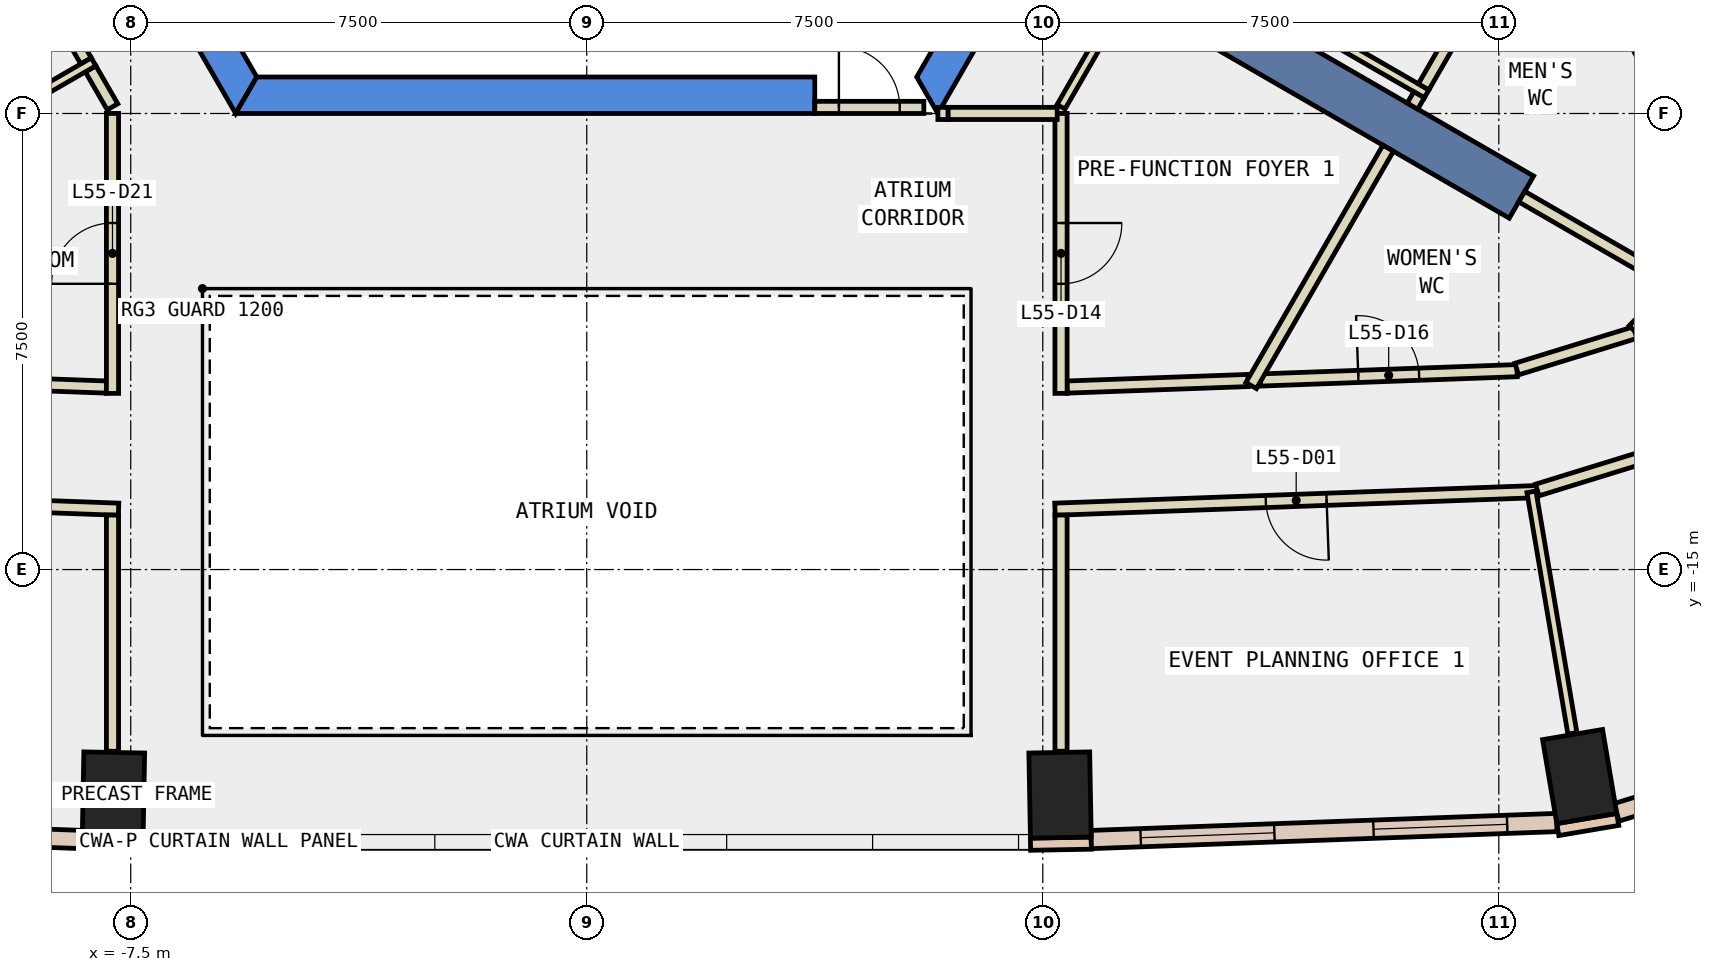
"""IFC4 building model, lengths in metres.
Left out: names, types, materials, properties, quantities, classifications, styles, units other than length and angle.
Written with IfcOpenShell. Run it as: python <this file> out.ifc"""

import sys

from ifc_helpers import new_model, si_unit, direction, frame, frame_2d, origin, origin_2d, place, context, subcontext, project, spatial, polyline, rectangle, outline, extrude, element, fill, save


model = new_model("IFC4")
c1 = context("Model", 3, precision=1e-05, world=origin(), true_north=direction((0.0, 1.0)))
c2 = subcontext(c1, "Body", "Model", "MODEL_VIEW")
j1 = project(units=[si_unit("LENGTHUNIT", "METRE"), si_unit("PLANEANGLEUNIT", "RADIAN")], contexts=[c1])
p1 = place(None, origin())
s1 = spatial("IfcSite", under=j1, at=p1, CompositionType="ELEMENT")
p2 = place(p1, origin())
s2 = spatial("IfcBuilding", under=s1, at=p2, CompositionType="ELEMENT")
p3 = place(p2, frame((0.0, 0.0, 245.0)))
s3 = spatial("IfcBuildingStorey", under=s2, at=p3, CompositionType="ELEMENT", Elevation=245.0)
for number, where, z_axis, x_axis in (
    (1, (-7.784, -18.708, -0.34), (0.0, 0.0, 1.0), (-1.0, 0.018, 0.0)),
    (2, (7.784, -18.708, -0.34), (0.0, 0.0, 1.0), (1.0, 0.018, 0.0)),
    (3, (16.33, -18.404, -0.34), (0.0, 0.0, 1.0), (0.986, 0.167, 0.0)),
):
    element("IfcColumn", number, at=place(p3, frame(where, z_axis=z_axis, x_axis=x_axis)), inside=s3, PredefinedType="COLUMN", context=c2, shape_type="SweptSolid", body=[
        extrude(rectangle(XDim=1.0, YDim=1.4, at=origin_2d()), origin(), (0.0, 0.0, 1.0), 3.6),
    ])
p4 = place(p3, frame((0.0, 0.0, -0.34)))
e4 = element("IfcWall", 4, at=p4, inside=s3, PredefinedType="SHEAR", context=c2, shape_type="SweptSolid", body=[
    extrude(outline(polyline([(-11.547, 2.5), (-5.774, -7.5), (-5.427, -6.9), (-10.854, 2.5), (-11.547, 2.5)])), origin(), (0.0, 0.0, 1.0), 3.6),
])
p5 = place(p3, frame((0.0, 0.0, -0.34)))
e5 = element("IfcWall", 5, at=p5, inside=s3, PredefinedType="SHEAR", context=c2, shape_type="SweptSolid", body=[
    extrude(outline(polyline([(3.75, -7.5), (3.75, -6.9), (-5.427, -6.9), (-5.774, -7.5), (3.75, -7.5)])), origin(), (0.0, 0.0, 1.0), 3.6),
])
p6 = place(p3, frame((0.0, 0.0, -0.34)))
e6 = element("IfcWall", 6, at=p6, inside=s3, PredefinedType="SHEAR", context=c2, shape_type="SweptSolid", body=[
    extrude(outline(polyline([(5.774, -7.5), (11.547, 2.5), (10.854, 2.5), (5.427, -6.9), (5.774, -7.5)])), origin(), (0.0, 0.0, 1.0), 3.6),
])
for number, where, z_axis, x_axis in (
    (7, (7.578, -4.375, -0.34), (0.0, 0.0, 1.0), (0.866, -0.5, 0.0)),
    (8, (-7.578, -4.375, -0.34), (0.0, 0.0, 1.0), (-0.866, -0.5, 0.0)),
):
    element("IfcWall", number, at=place(p3, frame(where, z_axis=z_axis, x_axis=x_axis)), inside=s3, PredefinedType="SHEAR", context=c2, shape_type="SweptSolid", body=[
        extrude(rectangle(XDim=9.0, YDim=0.8, at=frame_2d((4.5, 0.0))), origin(), (0.0, 0.0, 1.0), 3.6),
    ])
for number, where, z_axis, x_axis in (
    (9, (-8.298, -19.499, 0.0), (0.0, 0.0, 1.0), (1.0, -0.018, 0.0)),
    (10, (7.298, -19.517, 0.0), (0.0, 0.0, 1.0), (1.0, 0.018, 0.0)),
    (11, (15.97, -19.276, 0.0), (0.0, 0.0, 1.0), (0.986, 0.167, 0.0)),
):
    element("IfcWall", number, at=place(p3, frame(where, z_axis=z_axis, x_axis=x_axis)), inside=s3, PredefinedType="STANDARD", context=c2, shape_type="SweptSolid", body=[
        extrude(rectangle(XDim=1.0, YDim=0.2, at=frame_2d((0.5, 0.0))), origin(), (0.0, 0.0, 1.0), 3.26),
    ])
p7 = place(p3, frame((-15.952, -19.16, 0.0), z_axis=(0.0, 0.0, 1.0), x_axis=(0.999331753125, -0.036551979363, 0.0)))
e12 = element("IfcWall", 12, at=p7, inside=s3, PredefinedType="STANDARD", context=c2, shape_type="SweptSolid", body=[
    extrude(rectangle(XDim=7.661, YDim=0.3, at=frame_2d((3.831, 0.0))), origin(), (0.0, 0.0, 1.0), 3.26),
])
p8 = place(p7, frame((0.815, 0.0, 0.9)))
e13 = element("IfcOpeningElement", 13, at=p8, cuts=e12, PredefinedType="OPENING", context=c2, shape_type="SweptSolid", body=[
    extrude(rectangle(XDim=2.2, YDim=2.0, at=frame_2d((1.1, 1.0))), frame((0.0, 0.16, 0.0), z_axis=(0.0, -1.0, 0.0), x_axis=(1.0, 0.0, 0.0)), (0.0, 0.0, 1.0), 0.32),
])
p9 = place(p7, frame((4.646, 0.0, 0.9)))
e14 = element("IfcOpeningElement", 14, at=p9, cuts=e12, PredefinedType="OPENING", context=c2, shape_type="SweptSolid", body=[
    extrude(rectangle(XDim=2.2, YDim=2.0, at=frame_2d((1.1, 1.0))), frame((0.0, 0.16, 0.0), z_axis=(0.0, -1.0, 0.0), x_axis=(1.0, 0.0, 0.0)), (0.0, 0.0, 1.0), 0.32),
])
p10 = place(p3, frame((8.296, -19.44, 0.0), z_axis=(0.0, 0.0, 1.0), x_axis=(0.999331753125, 0.036551979363, 0.0)))
e15 = element("IfcWall", 15, at=p10, inside=s3, PredefinedType="STANDARD", context=c2, shape_type="SweptSolid", body=[
    extrude(rectangle(XDim=7.661, YDim=0.3, at=frame_2d((3.831, 0.0))), origin(), (0.0, 0.0, 1.0), 3.26),
])
p11 = place(p10, frame((0.815, 0.0, 0.9)))
e16 = element("IfcOpeningElement", 16, at=p11, cuts=e15, PredefinedType="OPENING", context=c2, shape_type="SweptSolid", body=[
    extrude(rectangle(XDim=2.2, YDim=2.0, at=frame_2d((1.1, 1.0))), frame((0.0, 0.16, 0.0), z_axis=(0.0, -1.0, 0.0), x_axis=(1.0, 0.0, 0.0)), (0.0, 0.0, 1.0), 0.32),
])
p12 = place(p10, frame((4.646, 0.0, 0.9)))
e17 = element("IfcOpeningElement", 17, at=p12, cuts=e15, PredefinedType="OPENING", context=c2, shape_type="SweptSolid", body=[
    extrude(rectangle(XDim=2.2, YDim=2.0, at=frame_2d((1.1, 1.0))), frame((0.0, 0.16, 0.0), z_axis=(0.0, -1.0, 0.0), x_axis=(1.0, 0.0, 0.0)), (0.0, 0.0, 1.0), 0.32),
])
p13 = place(p3, frame((16.936, -18.993, 0.0), z_axis=(0.0, 0.0, 1.0), x_axis=(0.955646189569, 0.2945171648, 0.0)))
e18 = element("IfcWall", 18, at=p13, inside=s3, PredefinedType="STANDARD", context=c2, shape_type="SweptSolid", body=[
    extrude(rectangle(XDim=3.898, YDim=0.3, at=frame_2d((1.949, 0.0))), origin(), (0.0, 0.0, 1.0), 3.26),
])
p14 = place(p13, frame((1.249, 0.0, 0.9)))
e19 = element("IfcOpeningElement", 19, at=p14, cuts=e18, PredefinedType="OPENING", context=c2, shape_type="SweptSolid", body=[
    extrude(rectangle(XDim=1.4, YDim=2.0, at=frame_2d((0.7, 1.0))), frame((0.0, 0.16, 0.0), z_axis=(0.0, -1.0, 0.0), x_axis=(1.0, 0.0, 0.0)), (0.0, 0.0, 1.0), 0.32),
])
p15 = place(p3, frame((7.9, -11.999, 0.0), z_axis=(0.0, 0.0, 1.0), x_axis=(0.999343711998, 0.036223546064, 0.0)))
e20 = element("IfcWall", 20, at=p15, inside=s3, PredefinedType="PARTITIONING", context=c2, shape_type="SweptSolid", body=[
    extrude(rectangle(XDim=2.979, YDim=0.2, at=frame_2d((1.49, 0.0))), origin(), (0.0, 0.0, 1.0), 3.26),
])
p16 = place(p3, frame((11.077, -11.883, 0.0), z_axis=(0.0, 0.0, 1.0), x_axis=(0.999335333519, 0.036453959732, 0.0)))
e21 = element("IfcWall", 21, at=p16, inside=s3, PredefinedType="PARTITIONING", context=c2, shape_type="SweptSolid", body=[
    extrude(rectangle(XDim=4.226, YDim=0.2, at=frame_2d((2.113, 0.0))), origin(), (0.0, 0.0, 1.0), 3.26),
])
p17 = place(p16, frame((1.613, 0.0, 0.0)))
e22 = element("IfcOpeningElement", 22, at=p17, cuts=e21, PredefinedType="OPENING", context=c2, shape_type="SweptSolid", body=[
    extrude(rectangle(XDim=1.0, YDim=2.1, at=frame_2d((0.5, 1.05))), frame((0.0, 0.11, 0.0), z_axis=(0.0, -1.0, 0.0), x_axis=(1.0, 0.0, 0.0)), (0.0, 0.0, 1.0), 0.22),
])
p18 = place(p3, frame((15.295, -11.703, 0.0), z_axis=(0.0, 0.0, 1.0), x_axis=(0.95563113363, 0.294566013716, 0.0)))
e23 = element("IfcWall", 23, at=p18, inside=s3, PredefinedType="PARTITIONING", context=c2, shape_type="SweptSolid", body=[
    extrude(rectangle(XDim=2.036, YDim=0.2, at=frame_2d((1.018, 0.0))), origin(), (0.0, 0.0, 1.0), 3.26),
])
p19 = place(p3, frame((17.215, -11.061, 0.0), z_axis=(0.0, 0.0, 1.0), x_axis=(0.698527813511, 0.715582904877, 0.0)))
e24 = element("IfcWall", 24, at=p19, inside=s3, PredefinedType="PARTITIONING", context=c2, shape_type="SweptSolid", body=[
    extrude(rectangle(XDim=1.002, YDim=0.2, at=frame_2d((0.501, 0.0))), origin(), (0.0, 0.0, 1.0), 3.26),
])
p20 = place(p3, frame((17.804, -7.374, 0.0), z_axis=(0.0, 0.0, 1.0), x_axis=(-0.465179971699, 0.885216128372, 0.0)))
e25 = element("IfcWall", 25, at=p20, inside=s3, PredefinedType="PARTITIONING", context=c2, shape_type="SweptSolid", body=[
    extrude(rectangle(XDim=4.424, YDim=0.2, at=frame_2d((2.212, 0.0))), origin(), (0.0, 0.0, 1.0), 3.26),
])
p21 = place(p20, frame((1.712, 0.0, 0.0)))
e26 = element("IfcOpeningElement", 26, at=p21, cuts=e25, PredefinedType="OPENING", context=c2, shape_type="SweptSolid", body=[
    extrude(rectangle(XDim=1.0, YDim=2.1, at=frame_2d((0.5, 1.05))), frame((0.0, 0.11, 0.0), z_axis=(0.0, -1.0, 0.0), x_axis=(1.0, 0.0, 0.0)), (0.0, 0.0, 1.0), 0.22),
])
p22 = place(p3, frame((-8.235, -6.636, 0.0), z_axis=(0.0, 0.0, 1.0), x_axis=(-0.500089055364, 0.86597398154, 0.0)))
e27 = element("IfcWall", 27, at=p22, inside=s3, PredefinedType="PARTITIONING", context=c2, shape_type="SweptSolid", body=[
    extrude(rectangle(XDim=1.23, YDim=0.2, at=frame_2d((0.615, 0.0))), origin(), (0.0, 0.0, 1.0), 3.26),
])
p23 = place(p3, frame((-7.8, -7.39, 0.0), z_axis=(0.0, 0.0, 1.0), x_axis=(-0.499712670472, 0.866191230024, 0.0)))
e28 = element("IfcWall", 28, at=p23, inside=s3, PredefinedType="PARTITIONING", context=c2, shape_type="SweptSolid", body=[
    extrude(rectangle(XDim=0.72, YDim=0.2, at=frame_2d((0.36, 0.0))), origin(), (0.0, 0.0, 1.0), 3.26),
])
p24 = place(p3, frame((-11.052, -11.884, 0.0), z_axis=(0.0, 0.0, 1.0), x_axis=(0.999335249241, -0.036456270033, 0.0)))
e29 = element("IfcWall", 29, at=p24, inside=s3, PredefinedType="PARTITIONING", context=c2, shape_type="SweptSolid", body=[
    extrude(rectangle(XDim=3.154, YDim=0.2, at=frame_2d((1.577, 0.0))), origin(), (0.0, 0.0, 1.0), 3.26),
])
p25 = place(p3, frame((15.636, -13.718, 0.0), z_axis=(0.0, 0.0, 1.0), x_axis=(-0.99933282306, -0.036522715615, 0.0)))
e30 = element("IfcWall", 30, at=p25, inside=s3, PredefinedType="PARTITIONING", context=c2, shape_type="SweptSolid", body=[
    extrude(rectangle(XDim=7.941, YDim=0.2, at=frame_2d((3.971, 0.0))), origin(), (0.0, 0.0, 1.0), 3.26),
])
p26 = place(p25, frame((3.471, 0.0, 0.0)))
e31 = element("IfcOpeningElement", 31, at=p26, cuts=e30, PredefinedType="OPENING", context=c2, shape_type="SweptSolid", body=[
    extrude(rectangle(XDim=1.0, YDim=2.1, at=frame_2d((0.5, 1.05))), frame((0.0, 0.11, 0.0), z_axis=(0.0, -1.0, 0.0), x_axis=(1.0, 0.0, 0.0)), (0.0, 0.0, 1.0), 0.22),
])
p27 = place(p3, frame((18.317, -12.864, 0.0), z_axis=(0.0, 0.0, 1.0), x_axis=(-0.955600342663, -0.294665887239, 0.0)))
e32 = element("IfcWall", 32, at=p27, inside=s3, PredefinedType="PARTITIONING", context=c2, shape_type="SweptSolid", body=[
    extrude(rectangle(XDim=2.81, YDim=0.2, at=frame_2d((1.405, 0.0))), origin(), (0.0, 0.0, 1.0), 3.26),
])
p28 = place(p3, frame((16.947, -1.443, 0.0), z_axis=(0.0, 0.0, 1.0), x_axis=(0.465133414481, -0.88524059257, 0.0)))
e33 = element("IfcWall", 33, at=p28, inside=s3, PredefinedType="PARTITIONING", context=c2, shape_type="SweptSolid", body=[
    extrude(rectangle(XDim=5.91, YDim=0.2, at=frame_2d((2.955, 0.0))), origin(), (0.0, 0.0, 1.0), 3.26),
])
p29 = place(p28, frame((2.455, 0.0, 0.0)))
e34 = element("IfcOpeningElement", 34, at=p29, cuts=e33, PredefinedType="OPENING", context=c2, shape_type="SweptSolid", body=[
    extrude(rectangle(XDim=1.0, YDim=2.1, at=frame_2d((0.5, 1.05))), frame((0.0, 0.11, 0.0), z_axis=(0.0, -1.0, 0.0), x_axis=(1.0, 0.0, 0.0)), (0.0, 0.0, 1.0), 0.22),
])
p30 = place(p3, frame((-7.7, -14.008, 0.0), z_axis=(0.0, 0.0, 1.0), x_axis=(-0.99933282306, 0.036522715615, 0.0)))
e35 = element("IfcWall", 35, at=p30, inside=s3, PredefinedType="PARTITIONING", context=c2, shape_type="SweptSolid", body=[
    extrude(rectangle(XDim=7.941, YDim=0.2, at=frame_2d((3.971, 0.0))), origin(), (0.0, 0.0, 1.0), 3.26),
])
p31 = place(p30, frame((3.471, 0.0, 0.0)))
e36 = element("IfcOpeningElement", 36, at=p31, cuts=e35, PredefinedType="OPENING", context=c2, shape_type="SweptSolid", body=[
    extrude(rectangle(XDim=1.0, YDim=2.1, at=frame_2d((0.5, 1.05))), frame((0.0, 0.11, 0.0), z_axis=(0.0, -1.0, 0.0), x_axis=(1.0, 0.0, 0.0)), (0.0, 0.0, 1.0), 0.22),
])
p32 = place(p3, frame((5.775, -7.499, 0.0), z_axis=(0.0, 0.0, 1.0), x_axis=(1.0, 0.0, 0.0)))
e37 = element("IfcWall", 37, at=p32, inside=s3, PredefinedType="PARTITIONING", context=c2, shape_type="SweptSolid", body=[
    extrude(rectangle(XDim=0.169, YDim=0.2, at=frame_2d((0.084, 0.0))), origin(), (0.0, 0.0, 1.0), 2.4),
])
p33 = place(p3, frame((7.8, -7.39, 0.0), z_axis=(0.0, 0.0, 1.0), x_axis=(0.499977374825, 0.866038466041, 0.0)))
e38 = element("IfcWall", 38, at=p33, inside=s3, PredefinedType="PARTITIONING", context=c2, shape_type="SweptSolid", body=[
    extrude(rectangle(XDim=2.1, YDim=0.15, at=frame_2d((1.05, 0.0))), origin(), (0.0, 0.0, 1.0), 3.26),
])
p34 = place(p3, frame((7.8, -7.499, 0.0), z_axis=(0.0, 0.0, 1.0), x_axis=(0.0, -1.0, 0.0)))
e39 = element("IfcWall", 39, at=p34, inside=s3, PredefinedType="PARTITIONING", context=c2, shape_type="SweptSolid", body=[
    extrude(rectangle(XDim=4.604, YDim=0.2, at=frame_2d((2.302, 0.0))), origin(), (0.0, 0.0, 1.0), 3.26),
])
p35 = place(p34, frame((1.802, 0.0, 0.0)))
e40 = element("IfcOpeningElement", 40, at=p35, cuts=e39, PredefinedType="OPENING", context=c2, shape_type="SweptSolid", body=[
    extrude(rectangle(XDim=1.0, YDim=2.1, at=frame_2d((0.5, 1.05))), frame((0.0, 0.11, 0.0), z_axis=(0.0, -1.0, 0.0), x_axis=(1.0, 0.0, 0.0)), (0.0, 0.0, 1.0), 0.22),
])
p36 = place(p3, frame((-7.8, -12.103, 0.0), z_axis=(0.0, 0.0, 1.0), x_axis=(0.0, 1.0, 0.0)))
e41 = element("IfcWall", 41, at=p36, inside=s3, PredefinedType="PARTITIONING", context=c2, shape_type="SweptSolid", body=[
    extrude(rectangle(XDim=4.604, YDim=0.2, at=frame_2d((2.302, 0.0))), origin(), (0.0, 0.0, 1.0), 3.26),
])
p37 = place(p36, frame((1.802, 0.0, 0.0)))
e42 = element("IfcOpeningElement", 42, at=p37, cuts=e41, PredefinedType="OPENING", context=c2, shape_type="SweptSolid", body=[
    extrude(rectangle(XDim=1.0, YDim=2.1, at=frame_2d((0.5, 1.05))), frame((0.0, 0.11, 0.0), z_axis=(0.0, -1.0, 0.0), x_axis=(1.0, 0.0, 0.0)), (0.0, 0.0, 1.0), 0.22),
])
for number, where, z_axis, x_axis in (
    (43, (7.8, -14.104, 0.0), (0.0, 0.0, 1.0), (0.0, -1.0, 0.0)),
    (44, (-7.8, -17.988, 0.0), (0.0, 0.0, 1.0), (0.0, 1.0, 0.0)),
):
    element("IfcWall", number, at=place(p3, frame(where, z_axis=z_axis, x_axis=x_axis)), inside=s3, PredefinedType="PARTITIONING", context=c2, shape_type="SweptSolid", body=[
        extrude(rectangle(XDim=3.884, YDim=0.2, at=frame_2d((1.942, 0.0))), origin(), (0.0, 0.0, 1.0), 3.26),
    ])
p38 = place(p3, frame((9.395, -4.627, 0.0), z_axis=(0.0, 0.0, 1.0), x_axis=(0.866034131428, -0.499984882974, 0.0)))
e45 = element("IfcWall", 45, at=p38, inside=s3, PredefinedType="PARTITIONING", context=c2, shape_type="SweptSolid", body=[
    extrude(rectangle(XDim=5.1, YDim=0.15, at=frame_2d((2.55, 0.0))), origin(), (0.0, 0.0, 1.0), 3.26),
])
p39 = place(p3, frame((13.18, -8.071, 0.0), z_axis=(0.0, 0.0, 1.0), x_axis=(-0.499914724673, -0.86607463192, 0.0)))
e46 = element("IfcWall", 46, at=p39, inside=s3, PredefinedType="PARTITIONING", context=c2, shape_type="SweptSolid", body=[
    extrude(rectangle(XDim=4.507, YDim=0.2, at=frame_2d((2.253, 0.0))), origin(), (0.0, 0.0, 1.0), 3.26),
])
p40 = place(p3, frame((13.688, -7.192, 0.0), z_axis=(0.0, 0.0, 1.0), x_axis=(-0.499787711288, -0.866147934042, 0.0)))
e47 = element("IfcWall", 47, at=p40, inside=s3, PredefinedType="PARTITIONING", context=c2, shape_type="SweptSolid", body=[
    extrude(rectangle(XDim=0.216, YDim=0.2, at=frame_2d((0.108, 0.0))), origin(), (0.0, 0.0, 1.0), 3.26),
])
p41 = place(p3, frame((15.793, -3.546, 0.0), z_axis=(0.0, 0.0, 1.0), x_axis=(-0.500000064182, -0.866025366729, 0.0)))
e48 = element("IfcWall", 48, at=p41, inside=s3, PredefinedType="PARTITIONING", context=c2, shape_type="SweptSolid", body=[
    extrude(rectangle(XDim=4.06, YDim=0.2, at=frame_2d((2.03, 0.0))), origin(), (0.0, 0.0, 1.0), 3.26),
])
p42 = place(p3, frame((15.377, -8.867, 0.0), z_axis=(0.0, 0.0, 1.0), x_axis=(0.865965767548, -0.500103278768, 0.0)))
e49 = element("IfcWall", 49, at=p42, inside=s3, PredefinedType="PARTITIONING", context=c2, shape_type="SweptSolid", body=[
    extrude(rectangle(XDim=3.033, YDim=0.2, at=frame_2d((1.517, 0.0))), origin(), (0.0, 0.0, 1.0), 3.26),
])
p43 = place(p3, frame((-8.111, -6.651, 0.0), z_axis=(0.0, 0.0, 1.0), x_axis=(-0.865984471925, -0.50007088936, 0.0)))
e50 = element("IfcWall", 50, at=p43, inside=s3, PredefinedType="PARTITIONING", context=c2, shape_type="SweptSolid", body=[
    extrude(rectangle(XDim=5.176, YDim=0.15, at=frame_2d((2.588, 0.0))), origin(), (0.0, 0.0, 1.0), 3.26),
])
p44 = place(p3, frame((15.537, -13.722, 0.0), z_axis=(0.0, 0.0, 1.0), x_axis=(0.167012380144, -0.985954798598, 0.0)))
e51 = element("IfcWall", 51, at=p44, inside=s3, PredefinedType="PARTITIONING", context=c2, shape_type="SweptSolid", body=[
    extrude(rectangle(XDim=4.029, YDim=0.15, at=frame_2d((2.014, 0.0))), origin(), (0.0, 0.0, 1.0), 3.26),
])
p45 = place(p3, frame((3.75, -7.4, 0.0), z_axis=(0.0, 0.0, 1.0), x_axis=(1.0, 0.0, 0.0)))
e52 = element("IfcWall", 52, at=p45, inside=s3, PredefinedType="PARTITIONING", context=c2, shape_type="SweptSolid", body=[
    extrude(rectangle(XDim=1.794, YDim=0.2, at=frame_2d((0.897, 0.0))), origin(), (0.0, 0.0, 1.0), 2.4),
])
p46 = place(p45, frame((0.397, 0.0, 0.0)))
e53 = element("IfcOpeningElement", 53, at=p46, cuts=e52, PredefinedType="OPENING", context=c2, shape_type="SweptSolid", body=[
    extrude(rectangle(XDim=1.0, YDim=2.1, at=frame_2d((0.5, 1.05))), frame((0.0, 0.11, 0.0), z_axis=(0.0, -1.0, 0.0), x_axis=(1.0, 0.0, 0.0)), (0.0, 0.0, 1.0), 0.22),
])
p47 = place(p3, frame((5.944, -7.499, 0.0), z_axis=(0.0, 0.0, 1.0), x_axis=(1.0, 0.0, 0.0)))
e54 = element("IfcWall", 54, at=p47, inside=s3, PredefinedType="PARTITIONING", context=c2, shape_type="SweptSolid", body=[
    extrude(rectangle(XDim=1.793, YDim=0.2, at=frame_2d((0.896, 0.0))), origin(), (0.0, 0.0, 1.0), 3.26),
])
p48 = place(p11, origin())
e55 = element("IfcWindow", 55, at=p48, inside=s3, PartitioningType="SINGLE_PANEL", PredefinedType="WINDOW", context=c2, shape_type="SweptSolid", body=[
    extrude(rectangle(XDim=2.2, YDim=2.0, at=frame_2d((1.1, 1.0))), frame((0.0, 0.03, 0.0), z_axis=(0.0, -1.0, 0.0), x_axis=(1.0, 0.0, 0.0)), (0.0, 0.0, 1.0), 0.06),
])
fill(e16, e55)
p49 = place(p12, origin())
e56 = element("IfcWindow", 56, at=p49, inside=s3, PartitioningType="SINGLE_PANEL", PredefinedType="WINDOW", context=c2, shape_type="SweptSolid", body=[
    extrude(rectangle(XDim=2.2, YDim=2.0, at=frame_2d((1.1, 1.0))), frame((0.0, 0.03, 0.0), z_axis=(0.0, -1.0, 0.0), x_axis=(1.0, 0.0, 0.0)), (0.0, 0.0, 1.0), 0.06),
])
fill(e17, e56)
p50 = place(p26, origin())
e57 = element("IfcDoor", 57, at=p50, inside=s3, OperationType="SINGLE_SWING_RIGHT", PredefinedType="DOOR", context=c2, shape_type="SweptSolid", body=[
    extrude(rectangle(XDim=1.0, YDim=2.1, at=frame_2d((0.5, 1.05))), frame((0.0, 0.025, 0.0), z_axis=(0.0, -1.0, 0.0), x_axis=(1.0, 0.0, 0.0)), (0.0, 0.0, 1.0), 0.05),
])
fill(e31, e57)
p51 = place(p35, origin())
e58 = element("IfcDoor", 58, at=p51, inside=s3, OperationType="SINGLE_SWING_LEFT", PredefinedType="DOOR", context=c2, shape_type="SweptSolid", body=[
    extrude(rectangle(XDim=1.0, YDim=2.1, at=frame_2d((0.5, 1.05))), frame((0.0, 0.025, 0.0), z_axis=(0.0, -1.0, 0.0), x_axis=(1.0, 0.0, 0.0)), (0.0, 0.0, 1.0), 0.05),
])
fill(e40, e58)
p52 = place(p17, origin())
e59 = element("IfcDoor", 59, at=p52, inside=s3, OperationType="SINGLE_SWING_LEFT", PredefinedType="DOOR", context=c2, shape_type="SweptSolid", body=[
    extrude(rectangle(XDim=1.0, YDim=2.1, at=frame_2d((0.5, 1.05))), frame((0.0, 0.025, 0.0), z_axis=(0.0, -1.0, 0.0), x_axis=(1.0, 0.0, 0.0)), (0.0, 0.0, 1.0), 0.05),
])
fill(e22, e59)
p53 = place(p37, origin())
e60 = element("IfcDoor", 60, at=p53, inside=s3, OperationType="SINGLE_SWING_LEFT", PredefinedType="DOOR", context=c2, shape_type="SweptSolid", body=[
    extrude(rectangle(XDim=1.0, YDim=2.1, at=frame_2d((0.5, 1.05))), frame((0.0, 0.025, 0.0), z_axis=(0.0, -1.0, 0.0), x_axis=(1.0, 0.0, 0.0)), (0.0, 0.0, 1.0), 0.05),
])
fill(e42, e60)
p54 = place(p46, origin())
e61 = element("IfcDoor", 61, at=p54, inside=s3, OperationType="SINGLE_SWING_LEFT", PredefinedType="DOOR", context=c2, shape_type="SweptSolid", body=[
    extrude(rectangle(XDim=1.0, YDim=2.1, at=frame_2d((0.5, 1.05))), frame((0.0, 0.025, 0.0), z_axis=(0.0, -1.0, 0.0), x_axis=(1.0, 0.0, 0.0)), (0.0, 0.0, 1.0), 0.05),
])
fill(e53, e61)
save(model, sys.argv[1])
